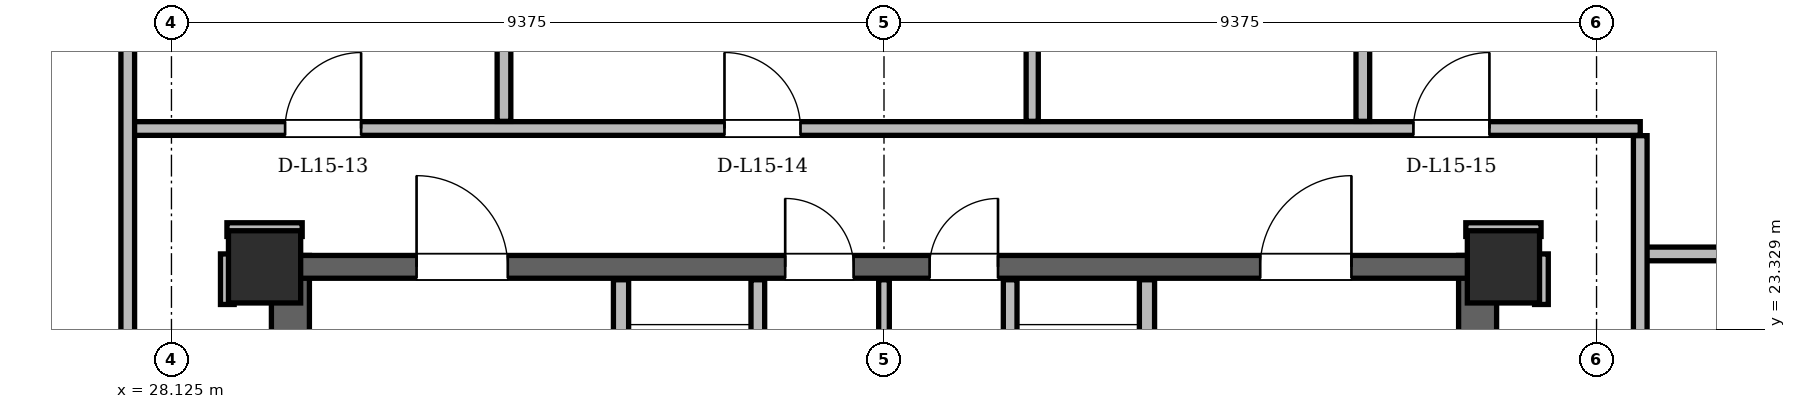
"""IFC4 building model, lengths in metres.
Left out: names, types, materials, properties, quantities, classifications, styles, units other than length and angle.
Written with IfcOpenShell. Run it as: python <this file> out.ifc"""

import sys

from ifc_helpers import new_model, si_unit, direction, frame, frame_2d, origin, origin_2d, place, context, subcontext, project, spatial, rectangle, hollow_rectangle, extrude, element, fill, save


model = new_model("IFC4")
c1 = context("Model", 3, precision=1e-05, world=origin(), true_north=direction((0.0, 1.0)))
c2 = subcontext(c1, "Body", "Model", "MODEL_VIEW")
j1 = project(units=[si_unit("LENGTHUNIT", "METRE"), si_unit("PLANEANGLEUNIT", "RADIAN")], contexts=[c1])
p1 = place(None, origin())
s1 = spatial("IfcSite", under=j1, at=p1, CompositionType="ELEMENT")
p2 = place(p1, origin())
s2 = spatial("IfcBuilding", under=s1, at=p2, CompositionType="ELEMENT")
p3 = place(p2, frame((0.0, 0.0, 59.7)))
s3 = spatial("IfcBuildingStorey", under=s2, at=p3, CompositionType="ELEMENT", Elevation=59.7)
for number, where, z_axis, x_axis in (
    (1, (45.65, 24.15, 0.0), (0.0, 0.0, 1.0), (1.0, 0.0, 0.0)),
    (2, (29.35, 24.15, 0.0), (0.0, 0.0, 1.0), (1.0, 0.0, 0.0)),
):
    element("IfcColumn", number, at=place(p3, frame(where, z_axis=z_axis, x_axis=x_axis)), inside=s3, PredefinedType="COLUMN", context=c2, shape_type="SweptSolid", body=[
        extrude(hollow_rectangle(XDim=0.95, YDim=0.95, WallThickness=0.08, at=origin_2d()), origin(), (0.0, 0.0, 1.0), 3.6),
    ])
for number, where, z_axis, x_axis in (
    (3, (29.69, 11.0, 0.0), (0.0, 0.0, 1.0), (0.0, 1.0, 0.0)),
    (4, (45.31, 11.0, 0.0), (0.0, 0.0, 1.0), (0.0, 1.0, 0.0)),
):
    element("IfcWall", number, at=place(p3, frame(where, z_axis=z_axis, x_axis=x_axis)), inside=s3, PredefinedType="SHEAR", context=c2, shape_type="SweptSolid", body=[
        extrude(rectangle(XDim=13.3, YDim=0.5, at=frame_2d((6.65, 0.0))), origin(), (0.0, 0.0, 1.0), 3.36),
    ])
p4 = place(p3, frame((29.65, 24.15, 0.0), z_axis=(0.0, 0.0, 1.0), x_axis=(1.0, 0.0, 0.0)))
e5 = element("IfcWall", 5, at=p4, inside=s3, PredefinedType="SHEAR", context=c2, shape_type="SweptSolid", body=[
    extrude(rectangle(XDim=15.7, YDim=0.3, at=frame_2d((7.85, 0.0))), origin(), (0.0, 0.0, 1.0), 3.36),
])
p5 = place(p4, frame((1.7, 0.0, 0.0)))
e6 = element("IfcOpeningElement", 6, at=p5, cuts=e5, PredefinedType="OPENING", context=c2, shape_type="SweptSolid", body=[
    extrude(rectangle(XDim=1.2, YDim=2.2, at=frame_2d((0.6, 1.1))), frame((0.0, 0.15, 0.0), z_axis=(0.0, -1.0, 0.0), x_axis=(1.0, 0.0, 0.0)), (0.0, 0.0, 1.0), 0.3),
])
p6 = place(p4, frame((12.8, 0.0, 0.0)))
e7 = element("IfcOpeningElement", 7, at=p6, cuts=e5, PredefinedType="OPENING", context=c2, shape_type="SweptSolid", body=[
    extrude(rectangle(XDim=1.2, YDim=2.2, at=frame_2d((0.6, 1.1))), frame((0.0, 0.15, 0.0), z_axis=(0.0, -1.0, 0.0), x_axis=(1.0, 0.0, 0.0)), (0.0, 0.0, 1.0), 0.3),
])
p7 = place(p4, frame((6.55, 0.0, 0.0)))
e8 = element("IfcOpeningElement", 8, at=p7, cuts=e5, PredefinedType="OPENING", context=c2, shape_type="SweptSolid", body=[
    extrude(rectangle(XDim=0.9, YDim=2.05, at=frame_2d((0.45, 1.025))), frame((0.0, 0.15, 0.0), z_axis=(0.0, -1.0, 0.0), x_axis=(1.0, 0.0, 0.0)), (0.0, 0.0, 1.0), 0.3),
])
p8 = place(p4, frame((8.45, 0.0, 0.0)))
e9 = element("IfcOpeningElement", 9, at=p8, cuts=e5, PredefinedType="OPENING", context=c2, shape_type="SweptSolid", body=[
    extrude(rectangle(XDim=0.9, YDim=2.05, at=frame_2d((0.45, 1.025))), frame((0.0, 0.15, 0.0), z_axis=(0.0, -1.0, 0.0), x_axis=(1.0, 0.0, 0.0)), (0.0, 0.0, 1.0), 0.3),
])
p9 = place(p3, frame((61.334, 14.47, 0.0), z_axis=(0.0, 0.0, 1.0), x_axis=(-0.499999743921, 0.866025551632, 0.0)))
e10 = element("IfcWall", 10, at=p9, inside=s3, PredefinedType="SOLIDWALL", context=c2, shape_type="SweptSolid", body=[
    extrude(rectangle(XDim=33.585, YDim=0.34, at=frame_2d((16.792, 0.0))), origin(), (0.0, 0.0, 1.0), 2.494),
])
p10 = place(p9, frame((7.615, 0.0, 0.0)))
e11 = element("IfcOpeningElement", 11, at=p10, cuts=e10, PredefinedType="OPENING", context=c2, shape_type="SweptSolid", body=[
    extrude(rectangle(XDim=1.5, YDim=2.2, at=frame_2d((0.75, 1.1))), frame((0.0, 0.17, 0.0), z_axis=(0.0, -1.0, 0.0), x_axis=(1.0, 0.0, 0.0)), (0.0, 0.0, 1.0), 0.34),
])
p11 = place(p9, frame((25.926, 0.0, 0.0)))
e12 = element("IfcOpeningElement", 12, at=p11, cuts=e10, PredefinedType="OPENING", context=c2, shape_type="SweptSolid", body=[
    extrude(rectangle(XDim=1.5, YDim=2.2, at=frame_2d((0.75, 1.1))), frame((0.0, 0.17, 0.0), z_axis=(0.0, -1.0, 0.0), x_axis=(1.0, 0.0, 0.0)), (0.0, 0.0, 1.0), 0.34),
])
p12 = place(p9, frame((1.544, 0.0, 0.85)))
e13 = element("IfcOpeningElement", 13, at=p12, cuts=e10, PredefinedType="OPENING", context=c2, shape_type="SweptSolid", body=[
    extrude(rectangle(XDim=1.4, YDim=1.534, at=frame_2d((0.7, 0.767))), frame((0.0, 0.17, 0.0), z_axis=(0.0, -1.0, 0.0), x_axis=(1.0, 0.0, 0.0)), (0.0, 0.0, 1.0), 0.34),
])
p13 = place(p9, frame((20.338, 0.0, 0.85)))
e14 = element("IfcOpeningElement", 14, at=p13, cuts=e10, PredefinedType="OPENING", context=c2, shape_type="SweptSolid", body=[
    extrude(rectangle(XDim=1.2, YDim=1.48, at=frame_2d((0.6, 0.74))), frame((0.0, 0.17, 0.0), z_axis=(0.0, -1.0, 0.0), x_axis=(1.0, 0.0, 0.0)), (0.0, 0.0, 1.0), 0.34),
])
p14 = place(p9, frame((29.519, 0.0, 0.85)))
e15 = element("IfcOpeningElement", 15, at=p14, cuts=e10, PredefinedType="OPENING", context=c2, shape_type="SweptSolid", body=[
    extrude(rectangle(XDim=2.2, YDim=1.534, at=frame_2d((1.1, 0.767))), frame((0.0, 0.17, 0.0), z_axis=(0.0, -1.0, 0.0), x_axis=(1.0, 0.0, 0.0)), (0.0, 0.0, 1.0), 0.34),
])
p15 = place(p9, frame((14.912, 0.0, 0.85)))
e16 = element("IfcOpeningElement", 16, at=p15, cuts=e10, PredefinedType="OPENING", context=c2, shape_type="SweptSolid", body=[
    extrude(rectangle(XDim=1.2, YDim=1.48, at=frame_2d((0.6, 0.74))), frame((0.0, 0.17, 0.0), z_axis=(0.0, -1.0, 0.0), x_axis=(1.0, 0.0, 0.0)), (0.0, 0.0, 1.0), 0.34),
])
p16 = place(p9, frame((17.664, 0.0, 0.85)))
e17 = element("IfcOpeningElement", 17, at=p16, cuts=e10, PredefinedType="OPENING", context=c2, shape_type="SweptSolid", body=[
    extrude(rectangle(XDim=1.2, YDim=1.48, at=frame_2d((0.6, 0.74))), frame((0.0, 0.17, 0.0), z_axis=(0.0, -1.0, 0.0), x_axis=(1.0, 0.0, 0.0)), (0.0, 0.0, 1.0), 0.34),
])
p17 = place(p3, frame((30.458, 43.556, 0.0), z_axis=(0.0, 0.0, 1.0), x_axis=(-0.499999743921, -0.866025551632, 0.0)))
e18 = element("IfcWall", 18, at=p17, inside=s3, PredefinedType="SOLIDWALL", context=c2, shape_type="SweptSolid", body=[
    extrude(rectangle(XDim=33.585, YDim=0.34, at=frame_2d((16.792, 0.0))), origin(), (0.0, 0.0, 1.0), 2.494),
])
p18 = place(p17, frame((7.615, 0.0, 0.0)))
e19 = element("IfcOpeningElement", 19, at=p18, cuts=e18, PredefinedType="OPENING", context=c2, shape_type="SweptSolid", body=[
    extrude(rectangle(XDim=1.5, YDim=2.2, at=frame_2d((0.75, 1.1))), frame((0.0, 0.17, 0.0), z_axis=(0.0, -1.0, 0.0), x_axis=(1.0, 0.0, 0.0)), (0.0, 0.0, 1.0), 0.34),
])
p19 = place(p17, frame((29.075, 0.0, 0.0)))
e20 = element("IfcOpeningElement", 20, at=p19, cuts=e18, PredefinedType="OPENING", context=c2, shape_type="SweptSolid", body=[
    extrude(rectangle(XDim=1.5, YDim=2.2, at=frame_2d((0.75, 1.1))), frame((0.0, 0.17, 0.0), z_axis=(0.0, -1.0, 0.0), x_axis=(1.0, 0.0, 0.0)), (0.0, 0.0, 1.0), 0.34),
])
p20 = place(p17, frame((11.943, 0.0, 0.85)))
e21 = element("IfcOpeningElement", 21, at=p20, cuts=e18, PredefinedType="OPENING", context=c2, shape_type="SweptSolid", body=[
    extrude(rectangle(XDim=1.8, YDim=1.534, at=frame_2d((0.9, 0.767))), frame((0.0, 0.17, 0.0), z_axis=(0.0, -1.0, 0.0), x_axis=(1.0, 0.0, 0.0)), (0.0, 0.0, 1.0), 0.34),
])
p21 = place(p17, frame((19.036, 0.0, 0.85)))
e22 = element("IfcOpeningElement", 22, at=p21, cuts=e18, PredefinedType="OPENING", context=c2, shape_type="SweptSolid", body=[
    extrude(rectangle(XDim=1.2, YDim=1.48, at=frame_2d((0.6, 0.74))), frame((0.0, 0.17, 0.0), z_axis=(0.0, -1.0, 0.0), x_axis=(1.0, 0.0, 0.0)), (0.0, 0.0, 1.0), 0.34),
])
p22 = place(p17, frame((1.223, 0.0, 0.85)))
e23 = element("IfcOpeningElement", 23, at=p22, cuts=e18, PredefinedType="OPENING", context=c2, shape_type="SweptSolid", body=[
    extrude(rectangle(XDim=1.8, YDim=1.534, at=frame_2d((0.9, 0.767))), frame((0.0, 0.17, 0.0), z_axis=(0.0, -1.0, 0.0), x_axis=(1.0, 0.0, 0.0)), (0.0, 0.0, 1.0), 0.34),
])
p23 = place(p3, frame((34.04, 19.48, 0.0), z_axis=(0.0, 0.0, 1.0), x_axis=(0.0, 1.0, 0.0)))
e24 = element("IfcWall", 24, at=p23, inside=s3, PredefinedType="PARTITIONING", context=c2, shape_type="SweptSolid", body=[
    extrude(rectangle(XDim=4.5, YDim=0.2, at=frame_2d((2.25, 0.0))), origin(), (0.0, 0.0, 1.0), 2.4),
])
p24 = place(p23, frame((2.12, 0.0, 0.0)))
e25 = element("IfcOpeningElement", 25, at=p24, cuts=e24, PredefinedType="OPENING", context=c2, shape_type="SweptSolid", body=[
    extrude(rectangle(XDim=1.1, YDim=2.2, at=frame_2d((0.55, 1.1))), frame((0.0, 0.1, 0.0), z_axis=(0.0, -1.0, 0.0), x_axis=(1.0, 0.0, 0.0)), (0.0, 0.0, 1.0), 0.2),
])
p25 = place(p3, frame((35.84, 20.96, 0.0), z_axis=(0.0, 0.0, 1.0), x_axis=(0.0, 1.0, 0.0)))
e26 = element("IfcWall", 26, at=p25, inside=s3, PredefinedType="PARTITIONING", context=c2, shape_type="SweptSolid", body=[
    extrude(rectangle(XDim=3.02, YDim=0.18, at=frame_2d((1.51, 0.0))), origin(), (0.0, 0.0, 1.0), 2.4),
])
p26 = place(p3, frame((40.96, 19.48, 0.0), z_axis=(0.0, 0.0, 1.0), x_axis=(0.0, 1.0, 0.0)))
e27 = element("IfcWall", 27, at=p26, inside=s3, PredefinedType="PARTITIONING", context=c2, shape_type="SweptSolid", body=[
    extrude(rectangle(XDim=4.5, YDim=0.2, at=frame_2d((2.25, 0.0))), origin(), (0.0, 0.0, 1.0), 2.4),
])
p27 = place(p26, frame((2.12, 0.0, 0.0)))
e28 = element("IfcOpeningElement", 28, at=p27, cuts=e27, PredefinedType="OPENING", context=c2, shape_type="SweptSolid", body=[
    extrude(rectangle(XDim=1.1, YDim=2.2, at=frame_2d((0.55, 1.1))), frame((0.0, 0.1, 0.0), z_axis=(0.0, -1.0, 0.0), x_axis=(1.0, 0.0, 0.0)), (0.0, 0.0, 1.0), 0.2),
])
p28 = place(p3, frame((39.16, 20.96, 0.0), z_axis=(0.0, 0.0, 1.0), x_axis=(0.0, 1.0, 0.0)))
e29 = element("IfcWall", 29, at=p28, inside=s3, PredefinedType="PARTITIONING", context=c2, shape_type="SweptSolid", body=[
    extrude(rectangle(XDim=3.02, YDim=0.18, at=frame_2d((1.51, 0.0))), origin(), (0.0, 0.0, 1.0), 2.4),
])
p29 = place(p3, frame((37.5, 21.06, 0.0), z_axis=(0.0, 0.0, 1.0), x_axis=(0.0, 1.0, 0.0)))
e30 = element("IfcWall", 30, at=p29, inside=s3, PredefinedType="PARTITIONING", context=c2, shape_type="SweptSolid", body=[
    extrude(rectangle(XDim=2.92, YDim=0.14, at=frame_2d((1.46, 0.0))), origin(), (0.0, 0.0, 1.0), 2.4),
])
p30 = place(p3, frame((47.45, 24.32, 0.0), z_axis=(0.0, 0.0, 1.0), x_axis=(1.0, 0.0, 0.0)))
e31 = element("IfcWall", 31, at=p30, inside=s3, PredefinedType="PARTITIONING", context=c2, shape_type="SweptSolid", body=[
    extrude(rectangle(XDim=7.997, YDim=0.18, at=frame_2d((3.998, 0.0))), origin(), (0.0, 0.0, 1.0), 3.36),
])
for number, where, z_axis, x_axis in (
    (32, (28.855, 24.64, 0.0), (0.0, 0.0, 1.0), (1.0, 0.0, 0.0)),
    (33, (45.155, 24.64, 0.0), (0.0, 0.0, 1.0), (1.0, 0.0, 0.0)),
):
    element("IfcWall", number, at=place(p3, frame(where, z_axis=z_axis, x_axis=x_axis)), inside=s3, PredefinedType="PARTITIONING", context=c2, shape_type="SweptSolid", body=[
        extrude(rectangle(XDim=0.99, YDim=0.18, at=frame_2d((0.495, 0.0))), origin(), (0.0, 0.0, 1.0), 2.738),
    ])
p31 = place(p3, frame((27.55, 25.97, 0.0), z_axis=(0.0, 0.0, 1.0), x_axis=(1.0, 0.0, 0.0)))
e34 = element("IfcWall", 34, at=p31, inside=s3, PredefinedType="PARTITIONING", context=c2, shape_type="SweptSolid", body=[
    extrude(rectangle(XDim=19.9, YDim=0.18, at=frame_2d((9.95, 0.0))), origin(), (0.0, 0.0, 1.0), 2.738),
])
p32 = place(p31, frame((2.07, 0.0, 0.0)))
e35 = element("IfcOpeningElement", 35, at=p32, cuts=e34, PredefinedType="OPENING", context=c2, shape_type="SweptSolid", body=[
    extrude(rectangle(XDim=1.0, YDim=2.18, at=frame_2d((0.5, 1.09))), frame((0.0, 0.09, 0.0), z_axis=(0.0, -1.0, 0.0), x_axis=(1.0, 0.0, 0.0)), (0.0, 0.0, 1.0), 0.18),
])
p33 = place(p31, frame((7.851, 0.0, 0.0)))
e36 = element("IfcOpeningElement", 36, at=p33, cuts=e34, PredefinedType="OPENING", context=c2, shape_type="SweptSolid", body=[
    extrude(rectangle(XDim=1.0, YDim=2.18, at=frame_2d((0.5, 1.09))), frame((0.0, 0.09, 0.0), z_axis=(0.0, -1.0, 0.0), x_axis=(1.0, 0.0, 0.0)), (0.0, 0.0, 1.0), 0.18),
])
p34 = place(p31, frame((16.916, 0.0, 0.0)))
e37 = element("IfcOpeningElement", 37, at=p34, cuts=e34, PredefinedType="OPENING", context=c2, shape_type="SweptSolid", body=[
    extrude(rectangle(XDim=1.0, YDim=2.18, at=frame_2d((0.5, 1.09))), frame((0.0, 0.09, 0.0), z_axis=(0.0, -1.0, 0.0), x_axis=(1.0, 0.0, 0.0)), (0.0, 0.0, 1.0), 0.18),
])
p35 = place(p3, frame((27.55, 11.044, 0.0), z_axis=(0.0, 0.0, 1.0), x_axis=(0.0, 1.0, 0.0)))
e38 = element("IfcWall", 38, at=p35, inside=s3, PredefinedType="PARTITIONING", context=c2, shape_type="SweptSolid", body=[
    extrude(rectangle(XDim=27.127, YDim=0.18, at=frame_2d((13.563, 0.0))), origin(), (0.0, 0.0, 1.0), 2.494),
])
p36 = place(p35, frame((10.795, 0.0, 0.0)))
e39 = element("IfcOpeningElement", 39, at=p36, cuts=e38, PredefinedType="OPENING", context=c2, shape_type="SweptSolid", body=[
    extrude(rectangle(XDim=1.0, YDim=2.18, at=frame_2d((0.5, 1.09))), frame((0.0, 0.09, 0.0), z_axis=(0.0, -1.0, 0.0), x_axis=(1.0, 0.0, 0.0)), (0.0, 0.0, 1.0), 0.18),
])
p37 = place(p3, frame((28.86, 23.655, 0.0), z_axis=(0.0, 0.0, 1.0), x_axis=(0.0, 1.0, 0.0)))
e40 = element("IfcWall", 40, at=p37, inside=s3, PredefinedType="PARTITIONING", context=c2, shape_type="SweptSolid", body=[
    extrude(rectangle(XDim=0.665, YDim=0.18, at=frame_2d((0.333, 0.0))), origin(), (0.0, 0.0, 1.0), 2.946),
])
p38 = place(p3, frame((32.5, 26.064, 0.0), z_axis=(0.0, 0.0, 1.0), x_axis=(0.0, 1.0, 0.0)))
e41 = element("IfcWall", 41, at=p38, inside=s3, PredefinedType="PARTITIONING", context=c2, shape_type="SweptSolid", body=[
    extrude(rectangle(XDim=17.318, YDim=0.18, at=frame_2d((8.659, 0.0))), origin(), (0.0, 0.0, 1.0), 3.36),
])
p39 = place(p3, frame((39.45, 26.064, 0.0), z_axis=(0.0, 0.0, 1.0), x_axis=(0.0, 1.0, 0.0)))
e42 = element("IfcWall", 42, at=p39, inside=s3, PredefinedType="PARTITIONING", context=c2, shape_type="SweptSolid", body=[
    extrude(rectangle(XDim=17.318, YDim=0.16, at=frame_2d((8.659, 0.0))), origin(), (0.0, 0.0, 1.0), 3.36),
])
p40 = place(p39, frame((1.445, 0.0, 0.0)))
e43 = element("IfcOpeningElement", 43, at=p40, cuts=e42, PredefinedType="OPENING", context=c2, shape_type="SweptSolid", body=[
    extrude(rectangle(XDim=0.92, YDim=2.12, at=frame_2d((0.46, 1.06))), frame((0.0, 0.08, 0.0), z_axis=(0.0, -1.0, 0.0), x_axis=(1.0, 0.0, 0.0)), (0.0, 0.0, 1.0), 0.16),
])
p41 = place(p39, frame((5.367, 0.0, 0.0)))
e44 = element("IfcOpeningElement", 44, at=p41, cuts=e42, PredefinedType="OPENING", context=c2, shape_type="SweptSolid", body=[
    extrude(rectangle(XDim=0.92, YDim=2.12, at=frame_2d((0.46, 1.06))), frame((0.0, 0.08, 0.0), z_axis=(0.0, -1.0, 0.0), x_axis=(1.0, 0.0, 0.0)), (0.0, 0.0, 1.0), 0.16),
])
p42 = place(p39, frame((8.734, 0.0, 0.0)))
e45 = element("IfcOpeningElement", 45, at=p42, cuts=e42, PredefinedType="OPENING", context=c2, shape_type="SweptSolid", body=[
    extrude(rectangle(XDim=0.95, YDim=2.1, at=frame_2d((0.475, 1.05))), frame((0.0, 0.08, 0.0), z_axis=(0.0, -1.0, 0.0), x_axis=(1.0, 0.0, 0.0)), (0.0, 0.0, 1.0), 0.16),
])
p43 = place(p39, frame((11.574, 0.0, 0.0)))
e46 = element("IfcOpeningElement", 46, at=p43, cuts=e42, PredefinedType="OPENING", context=c2, shape_type="SweptSolid", body=[
    extrude(rectangle(XDim=0.95, YDim=2.1, at=frame_2d((0.475, 1.05))), frame((0.0, 0.08, 0.0), z_axis=(0.0, -1.0, 0.0), x_axis=(1.0, 0.0, 0.0)), (0.0, 0.0, 1.0), 0.16),
])
p44 = place(p39, frame((13.952, 0.0, 0.0)))
e47 = element("IfcOpeningElement", 47, at=p44, cuts=e42, PredefinedType="OPENING", context=c2, shape_type="SweptSolid", body=[
    extrude(rectangle(XDim=0.95, YDim=2.1, at=frame_2d((0.475, 1.05))), frame((0.0, 0.08, 0.0), z_axis=(0.0, -1.0, 0.0), x_axis=(1.0, 0.0, 0.0)), (0.0, 0.0, 1.0), 0.16),
])
p45 = place(p39, frame((15.972, 0.0, 0.0)))
e48 = element("IfcOpeningElement", 48, at=p45, cuts=e42, PredefinedType="OPENING", context=c2, shape_type="SweptSolid", body=[
    extrude(rectangle(XDim=0.88, YDim=2.08, at=frame_2d((0.44, 1.04))), frame((0.0, 0.08, 0.0), z_axis=(0.0, -1.0, 0.0), x_axis=(1.0, 0.0, 0.0)), (0.0, 0.0, 1.0), 0.16),
])
p46 = place(p3, frame((43.8, 26.064, 0.0), z_axis=(0.0, 0.0, 1.0), x_axis=(0.0, 1.0, 0.0)))
e49 = element("IfcWall", 49, at=p46, inside=s3, PredefinedType="PARTITIONING", context=c2, shape_type="SweptSolid", body=[
    extrude(rectangle(XDim=17.318, YDim=0.18, at=frame_2d((8.659, 0.0))), origin(), (0.0, 0.0, 1.0), 3.36),
])
p47 = place(p3, frame((46.15, 23.655, 0.0), z_axis=(0.0, 0.0, 1.0), x_axis=(0.0, 1.0, 0.0)))
e50 = element("IfcWall", 50, at=p47, inside=s3, PredefinedType="PARTITIONING", context=c2, shape_type="SweptSolid", body=[
    extrude(rectangle(XDim=0.665, YDim=0.18, at=frame_2d((0.333, 0.0))), origin(), (0.0, 0.0, 1.0), 2.946),
])
p48 = place(p3, frame((47.45, 11.044, 0.0), z_axis=(0.0, 0.0, 1.0), x_axis=(0.0, 1.0, 0.0)))
e51 = element("IfcWall", 51, at=p48, inside=s3, PredefinedType="PARTITIONING", context=c2, shape_type="SweptSolid", body=[
    extrude(rectangle(XDim=14.832, YDim=0.18, at=frame_2d((7.416, 0.0))), origin(), (0.0, 0.0, 1.0), 2.738),
])
p49 = place(p48, frame((6.079, 0.0, 0.0)))
e52 = element("IfcOpeningElement", 52, at=p49, cuts=e51, PredefinedType="OPENING", context=c2, shape_type="SweptSolid", body=[
    extrude(rectangle(XDim=1.0, YDim=2.18, at=frame_2d((0.5, 1.09))), frame((0.0, 0.09, 0.0), z_axis=(0.0, -1.0, 0.0), x_axis=(1.0, 0.0, 0.0)), (0.0, 0.0, 1.0), 0.18),
])
p50 = place(p48, frame((10.668, 0.0, 0.0)))
e53 = element("IfcOpeningElement", 53, at=p50, cuts=e51, PredefinedType="OPENING", context=c2, shape_type="SweptSolid", body=[
    extrude(rectangle(XDim=1.0, YDim=2.18, at=frame_2d((0.5, 1.09))), frame((0.0, 0.09, 0.0), z_axis=(0.0, -1.0, 0.0), x_axis=(1.0, 0.0, 0.0)), (0.0, 0.0, 1.0), 0.18),
])
p51 = place(p5, origin())
e54 = element("IfcDoor", 54, at=p51, inside=s3, OperationType="SINGLE_SWING_LEFT", PredefinedType="DOOR", context=c2, shape_type="SweptSolid", body=[
    extrude(rectangle(XDim=1.2, YDim=2.2, at=frame_2d((0.6, 1.1))), frame((0.0, 0.025, 0.0), z_axis=(0.0, -1.0, 0.0), x_axis=(1.0, 0.0, 0.0)), (0.0, 0.0, 1.0), 0.05),
])
fill(e6, e54)
p52 = place(p6, origin())
e55 = element("IfcDoor", 55, at=p52, inside=s3, OperationType="SINGLE_SWING_RIGHT", PredefinedType="DOOR", context=c2, shape_type="SweptSolid", body=[
    extrude(rectangle(XDim=1.2, YDim=2.2, at=frame_2d((0.6, 1.1))), frame((0.0, 0.025, 0.0), z_axis=(0.0, -1.0, 0.0), x_axis=(1.0, 0.0, 0.0)), (0.0, 0.0, 1.0), 0.05),
])
fill(e7, e55)
p53 = place(p7, origin())
e56 = element("IfcDoor", 56, at=p53, inside=s3, OperationType="SINGLE_SWING_LEFT", PredefinedType="DOOR", context=c2, shape_type="SweptSolid", body=[
    extrude(rectangle(XDim=0.9, YDim=2.05, at=frame_2d((0.45, 1.025))), frame((0.0, 0.025, 0.0), z_axis=(0.0, -1.0, 0.0), x_axis=(1.0, 0.0, 0.0)), (0.0, 0.0, 1.0), 0.05),
])
fill(e8, e56)
p54 = place(p8, origin())
e57 = element("IfcDoor", 57, at=p54, inside=s3, OperationType="SINGLE_SWING_RIGHT", PredefinedType="DOOR", context=c2, shape_type="SweptSolid", body=[
    extrude(rectangle(XDim=0.9, YDim=2.05, at=frame_2d((0.45, 1.025))), frame((0.0, 0.025, 0.0), z_axis=(0.0, -1.0, 0.0), x_axis=(1.0, 0.0, 0.0)), (0.0, 0.0, 1.0), 0.05),
])
fill(e9, e57)
p55 = place(p32, origin())
e58 = element("IfcDoor", 58, at=p55, inside=s3, OperationType="SINGLE_SWING_RIGHT", PredefinedType="DOOR", context=c2, shape_type="SweptSolid", body=[
    extrude(rectangle(XDim=1.0, YDim=2.18, at=frame_2d((0.5, 1.09))), frame((0.0, 0.025, 0.0), z_axis=(0.0, -1.0, 0.0), x_axis=(1.0, 0.0, 0.0)), (0.0, 0.0, 1.0), 0.05),
])
fill(e35, e58)
p56 = place(p33, origin())
e59 = element("IfcDoor", 59, at=p56, inside=s3, OperationType="SINGLE_SWING_LEFT", PredefinedType="DOOR", context=c2, shape_type="SweptSolid", body=[
    extrude(rectangle(XDim=1.0, YDim=2.18, at=frame_2d((0.5, 1.09))), frame((0.0, 0.025, 0.0), z_axis=(0.0, -1.0, 0.0), x_axis=(1.0, 0.0, 0.0)), (0.0, 0.0, 1.0), 0.05),
])
fill(e36, e59)
p57 = place(p34, origin())
e60 = element("IfcDoor", 60, at=p57, inside=s3, OperationType="SINGLE_SWING_RIGHT", PredefinedType="DOOR", context=c2, shape_type="SweptSolid", body=[
    extrude(rectangle(XDim=1.0, YDim=2.18, at=frame_2d((0.5, 1.09))), frame((0.0, 0.025, 0.0), z_axis=(0.0, -1.0, 0.0), x_axis=(1.0, 0.0, 0.0)), (0.0, 0.0, 1.0), 0.05),
])
fill(e37, e60)
save(model, sys.argv[1])
